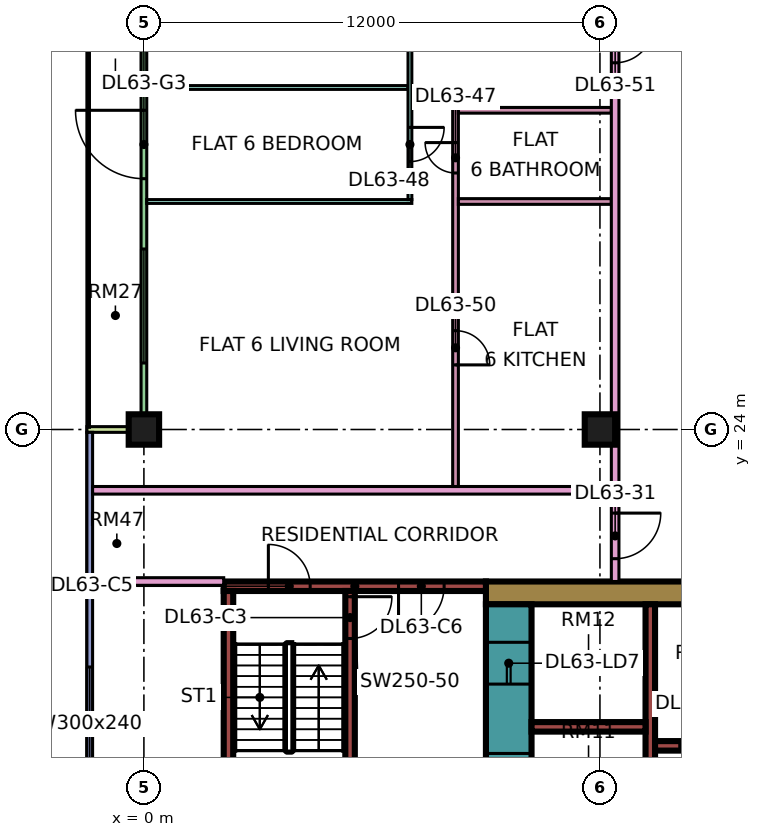
"""IFC4 building model, lengths in metres.
Left out: names, types, materials, properties, quantities, classifications, styles, units other than length and angle.
Written with IfcOpenShell. Run it as: python <this file> out.ifc"""

import sys

from ifc_helpers import new_model, si_unit, direction, frame, frame_2d, origin, origin_2d, place, context, subcontext, project, spatial, rectangle, extrude, element, fill, save


model = new_model("IFC4")
c1 = context("Model", 3, precision=1e-05, world=origin(), true_north=direction((0.0, 1.0)))
c2 = subcontext(c1, "Body", "Model", "MODEL_VIEW")
j1 = project(units=[si_unit("LENGTHUNIT", "METRE"), si_unit("PLANEANGLEUNIT", "RADIAN")], contexts=[c1])
p1 = place(None, origin())
s1 = spatial("IfcSite", under=j1, at=p1, CompositionType="ELEMENT")
p2 = place(p1, origin())
s2 = spatial("IfcBuilding", under=s1, at=p2, CompositionType="ELEMENT")
p3 = place(p2, frame((0.0, 0.0, 273.4)))
s3 = spatial("IfcBuildingStorey", under=s2, at=p3, CompositionType="ELEMENT", Elevation=273.4)
for number, where, z_axis, x_axis in (
    (1, (0.0, 24.0, 0.0), (0.0, 0.0, 1.0), (1.0, 0.0, 0.0)),
    (2, (12.0, 24.0, 0.0), (0.0, 0.0, 1.0), (1.0, 0.0, 0.0)),
):
    element("IfcColumn", number, at=place(p3, frame(where, z_axis=z_axis, x_axis=x_axis)), inside=s3, PredefinedType="COLUMN", context=c2, shape_type="SweptSolid", body=[
        extrude(rectangle(XDim=0.8, YDim=0.8, at=origin_2d()), origin(), (0.0, 0.0, 1.0), 3.75),
    ])
p4 = place(p3, frame((9.0, 19.7, 0.0), z_axis=(0.0, 0.0, 1.0), x_axis=(1.0, 0.0, 0.0)))
e3 = element("IfcWall", 3, at=p4, inside=s3, PredefinedType="SHEAR", context=c2, shape_type="SweptSolid", body=[
    extrude(rectangle(XDim=25.0, YDim=0.6, at=frame_2d((12.5, 0.0))), origin(), (0.0, 0.0, 1.0), 3.75),
])
p5 = place(p4, frame((19.1, 0.0, 0.0)))
e4 = element("IfcOpeningElement", 4, at=p5, cuts=e3, PredefinedType="OPENING", context=c2, shape_type="SweptSolid", body=[
    extrude(rectangle(XDim=1.8, YDim=2.4, at=frame_2d((0.9, 1.2))), frame((0.0, 0.31, 0.0), z_axis=(0.0, -1.0, 0.0), x_axis=(1.0, 0.0, 0.0)), (0.0, 0.0, 1.0), 0.62),
])
p6 = place(p3, frame((9.6, 7.6, 0.0), z_axis=(0.0, 0.0, 1.0), x_axis=(0.0, 1.0, 0.0)))
e5 = element("IfcWall", 5, at=p6, inside=s3, PredefinedType="SHEAR", context=c2, shape_type="SweptSolid", body=[
    extrude(rectangle(XDim=11.8, YDim=1.2, at=frame_2d((5.9, 0.0))), origin(), (0.0, 0.0, 1.0), 3.75),
])
p7 = place(p6, frame((4.275, 0.0, 0.0)))
e6 = element("IfcOpeningElement", 6, at=p7, cuts=e5, PredefinedType="OPENING", context=c2, shape_type="SweptSolid", body=[
    extrude(rectangle(XDim=1.1, YDim=2.2, at=frame_2d((0.55, 1.1))), frame((0.0, 0.61, 0.0), z_axis=(0.0, -1.0, 0.0), x_axis=(1.0, 0.0, 0.0)), (0.0, 0.0, 1.0), 1.22),
])
p8 = place(p6, frame((6.775, 0.0, 0.0)))
e7 = element("IfcOpeningElement", 7, at=p8, cuts=e5, PredefinedType="OPENING", context=c2, shape_type="SweptSolid", body=[
    extrude(rectangle(XDim=1.1, YDim=2.2, at=frame_2d((0.55, 1.1))), frame((0.0, 0.61, 0.0), z_axis=(0.0, -1.0, 0.0), x_axis=(1.0, 0.0, 0.0)), (0.0, 0.0, 1.0), 1.22),
])
p9 = place(p6, frame((9.7, 0.0, 0.0)))
e8 = element("IfcOpeningElement", 8, at=p9, cuts=e5, PredefinedType="OPENING", context=c2, shape_type="SweptSolid", body=[
    extrude(rectangle(XDim=1.1, YDim=2.2, at=frame_2d((0.55, 1.1))), frame((0.0, 0.61, 0.0), z_axis=(0.0, -1.0, 0.0), x_axis=(1.0, 0.0, 0.0)), (0.0, 0.0, 1.0), 1.22),
])
p10 = place(p6, frame((1.95, 0.0, 0.0)))
e9 = element("IfcOpeningElement", 9, at=p10, cuts=e5, PredefinedType="OPENING", context=c2, shape_type="SweptSolid", body=[
    extrude(rectangle(XDim=0.9, YDim=2.1, at=frame_2d((0.45, 1.05))), frame((0.0, 0.61, 0.0), z_axis=(0.0, -1.0, 0.0), x_axis=(1.0, 0.0, 0.0)), (0.0, 0.0, 1.0), 1.22),
])
p11 = place(p3, frame((13.325, 7.6, 0.0), z_axis=(0.0, 0.0, 1.0), x_axis=(0.0, 1.0, 0.0)))
e10 = element("IfcWall", 10, at=p11, inside=s3, PredefinedType="SHEAR", context=c2, shape_type="SweptSolid", body=[
    extrude(rectangle(XDim=11.8, YDim=0.25, at=frame_2d((5.9, 0.0))), origin(), (0.0, 0.0, 1.0), 3.75),
])
p12 = place(p3, frame((13.45, 15.675, 0.0), z_axis=(0.0, 0.0, 1.0), x_axis=(1.0, 0.0, 0.0)))
e11 = element("IfcWall", 11, at=p12, inside=s3, PredefinedType="SHEAR", context=c2, shape_type="SweptSolid", body=[
    extrude(rectangle(XDim=13.75, YDim=0.25, at=frame_2d((6.875, 0.0))), origin(), (0.0, 0.0, 1.0), 3.75),
])
p13 = place(p12, frame((0.65, 0.0, 0.0)))
e12 = element("IfcOpeningElement", 12, at=p13, cuts=e11, PredefinedType="OPENING", context=c2, shape_type="SweptSolid", body=[
    extrude(rectangle(XDim=1.2, YDim=2.2, at=frame_2d((0.6, 1.1))), frame((0.0, 0.135, 0.0), z_axis=(0.0, -1.0, 0.0), x_axis=(1.0, 0.0, 0.0)), (0.0, 0.0, 1.0), 0.27),
])
p14 = place(p12, frame((3.4, 0.0, 0.0)))
e13 = element("IfcOpeningElement", 13, at=p14, cuts=e11, PredefinedType="OPENING", context=c2, shape_type="SweptSolid", body=[
    extrude(rectangle(XDim=1.2, YDim=2.2, at=frame_2d((0.6, 1.1))), frame((0.0, 0.135, 0.0), z_axis=(0.0, -1.0, 0.0), x_axis=(1.0, 0.0, 0.0)), (0.0, 0.0, 1.0), 0.27),
])
p15 = place(p12, frame((6.15, 0.0, 0.0)))
e14 = element("IfcOpeningElement", 14, at=p15, cuts=e11, PredefinedType="OPENING", context=c2, shape_type="SweptSolid", body=[
    extrude(rectangle(XDim=1.2, YDim=2.2, at=frame_2d((0.6, 1.1))), frame((0.0, 0.135, 0.0), z_axis=(0.0, -1.0, 0.0), x_axis=(1.0, 0.0, 0.0)), (0.0, 0.0, 1.0), 0.27),
])
p16 = place(p12, frame((8.9, 0.0, 0.0)))
e15 = element("IfcOpeningElement", 15, at=p16, cuts=e11, PredefinedType="OPENING", context=c2, shape_type="SweptSolid", body=[
    extrude(rectangle(XDim=1.2, YDim=2.2, at=frame_2d((0.6, 1.1))), frame((0.0, 0.135, 0.0), z_axis=(0.0, -1.0, 0.0), x_axis=(1.0, 0.0, 0.0)), (0.0, 0.0, 1.0), 0.27),
])
p17 = place(p12, frame((11.8, 0.0, 0.0)))
e16 = element("IfcOpeningElement", 16, at=p17, cuts=e11, PredefinedType="OPENING", context=c2, shape_type="SweptSolid", body=[
    extrude(rectangle(XDim=0.9, YDim=2.1, at=frame_2d((0.45, 1.05))), frame((0.0, 0.135, 0.0), z_axis=(0.0, -1.0, 0.0), x_axis=(1.0, 0.0, 0.0)), (0.0, 0.0, 1.0), 0.27),
])
p18 = place(p3, frame((10.2, 16.175, 0.0), z_axis=(0.0, 0.0, 1.0), x_axis=(1.0, 0.0, 0.0)))
e17 = element("IfcWall", 17, at=p18, inside=s3, PredefinedType="SHEAR", context=c2, shape_type="SweptSolid", body=[
    extrude(rectangle(XDim=3.0, YDim=0.25, at=frame_2d((1.5, 0.0))), origin(), (0.0, 0.0, 1.0), 3.75),
])
p19 = place(p3, frame((2.1, 19.875, 0.0), z_axis=(0.0, 0.0, 1.0), x_axis=(1.0, 0.0, 0.0)))
e18 = element("IfcWall", 18, at=p19, inside=s3, PredefinedType="SHEAR", context=c2, shape_type="SweptSolid", body=[
    extrude(rectangle(XDim=6.9, YDim=0.25, at=frame_2d((3.45, 0.0))), origin(), (0.0, 0.0, 1.0), 3.75),
])
p20 = place(p19, frame((1.175, 0.0, 0.0)))
e19 = element("IfcOpeningElement", 19, at=p20, cuts=e18, PredefinedType="OPENING", context=c2, shape_type="SweptSolid", body=[
    extrude(rectangle(XDim=1.1, YDim=2.2, at=frame_2d((0.55, 1.1))), frame((0.0, 0.135, 0.0), z_axis=(0.0, -1.0, 0.0), x_axis=(1.0, 0.0, 0.0)), (0.0, 0.0, 1.0), 0.27),
])
p21 = place(p19, frame((4.6, 0.0, 0.0)))
e20 = element("IfcOpeningElement", 20, at=p21, cuts=e18, PredefinedType="OPENING", context=c2, shape_type="SweptSolid", body=[
    extrude(rectangle(XDim=1.2, YDim=2.2, at=frame_2d((0.6, 1.1))), frame((0.0, 0.135, 0.0), z_axis=(0.0, -1.0, 0.0), x_axis=(1.0, 0.0, 0.0)), (0.0, 0.0, 1.0), 0.27),
])
p22 = place(p3, frame((2.225, 13.25, 0.0), z_axis=(0.0, 0.0, 1.0), x_axis=(0.0, 1.0, 0.0)))
e21 = element("IfcWall", 21, at=p22, inside=s3, PredefinedType="SHEAR", context=c2, shape_type="SweptSolid", body=[
    extrude(rectangle(XDim=6.5, YDim=0.25, at=frame_2d((3.25, 0.0))), origin(), (0.0, 0.0, 1.0), 3.75),
])
p23 = place(p3, frame((5.425, 13.25, 0.0), z_axis=(0.0, 0.0, 1.0), x_axis=(0.0, 1.0, 0.0)))
e22 = element("IfcWall", 22, at=p23, inside=s3, PredefinedType="SHEAR", context=c2, shape_type="SweptSolid", body=[
    extrude(rectangle(XDim=6.5, YDim=0.25, at=frame_2d((3.25, 0.0))), origin(), (0.0, 0.0, 1.0), 3.75),
])
p24 = place(p23, frame((5.25, 0.0, 0.0)))
e23 = element("IfcOpeningElement", 23, at=p24, cuts=e22, PredefinedType="OPENING", context=c2, shape_type="SweptSolid", body=[
    extrude(rectangle(XDim=1.1, YDim=2.2, at=frame_2d((0.55, 1.1))), frame((0.0, 0.135, 0.0), z_axis=(0.0, -1.0, 0.0), x_axis=(1.0, 0.0, 0.0)), (0.0, 0.0, 1.0), 0.27),
])
p25 = place(p3, frame((0.0, 35.925, 0.0), z_axis=(0.0, 0.0, 1.0), x_axis=(0.0, -1.0, 0.0)))
e24 = element("IfcWall", 24, at=p25, inside=s3, PredefinedType="SOLIDWALL", context=c2, shape_type="SweptSolid", body=[
    extrude(rectangle(XDim=11.85, YDim=0.15, at=frame_2d((5.925, 0.0))), origin(), (0.0, 0.0, 1.0), 3.35),
])
p26 = place(p25, frame((0.775, 0.0, 0.45)))
e25 = element("IfcOpeningElement", 25, at=p26, cuts=e24, PredefinedType="OPENING", context=c2, shape_type="SweptSolid", body=[
    extrude(rectangle(XDim=1.8, YDim=2.4, at=frame_2d((0.9, 1.2))), frame((0.0, 0.085, 0.0), z_axis=(0.0, -1.0, 0.0), x_axis=(1.0, 0.0, 0.0)), (0.0, 0.0, 1.0), 0.17),
])
p27 = place(p25, frame((3.525, 0.0, 0.0)))
e26 = element("IfcOpeningElement", 26, at=p27, cuts=e24, PredefinedType="OPENING", context=c2, shape_type="SweptSolid", body=[
    extrude(rectangle(XDim=1.8, YDim=2.4, at=frame_2d((0.9, 1.2))), frame((0.0, 0.085, 0.0), z_axis=(0.0, -1.0, 0.0), x_axis=(1.0, 0.0, 0.0)), (0.0, 0.0, 1.0), 0.17),
])
p28 = place(p25, frame((7.175, 0.0, 0.45)))
e27 = element("IfcOpeningElement", 27, at=p28, cuts=e24, PredefinedType="OPENING", context=c2, shape_type="SweptSolid", body=[
    extrude(rectangle(XDim=3.0, YDim=2.4, at=frame_2d((1.5, 1.2))), frame((0.0, 0.085, 0.0), z_axis=(0.0, -1.0, 0.0), x_axis=(1.0, 0.0, 0.0)), (0.0, 0.0, 1.0), 0.17),
])
p29 = place(p3, frame((-1.5, 24.0, 0.0), z_axis=(0.0, 0.0, 1.0), x_axis=(1.0, 0.0, 0.0)))
e28 = element("IfcWall", 28, at=p29, inside=s3, PredefinedType="SOLIDWALL", context=c2, shape_type="SweptSolid", body=[
    extrude(rectangle(XDim=1.5, YDim=0.15, at=frame_2d((0.75, 0.0))), origin(), (0.0, 0.0, 1.0), 3.35),
])
p30 = place(p3, frame((-1.425, 23.925, 0.0), z_axis=(0.0, 0.0, 1.0), x_axis=(0.0, -1.0, 0.0)))
e29 = element("IfcWall", 29, at=p30, inside=s3, PredefinedType="SOLIDWALL", context=c2, shape_type="SweptSolid", body=[
    extrude(rectangle(XDim=11.425, YDim=0.15, at=frame_2d((5.712, 0.0))), origin(), (0.0, 0.0, 1.0), 3.35),
])
p31 = place(p30, frame((6.175, 0.0, 0.45)))
e30 = element("IfcOpeningElement", 30, at=p31, cuts=e29, PredefinedType="OPENING", context=c2, shape_type="SweptSolid", body=[
    extrude(rectangle(XDim=3.0, YDim=2.4, at=frame_2d((1.5, 1.2))), frame((0.0, 0.085, 0.0), z_axis=(0.0, -1.0, 0.0), x_axis=(1.0, 0.0, 0.0)), (0.0, 0.0, 1.0), 0.17),
])
p32 = place(p3, frame((-1.35, 20.0, 0.0), z_axis=(0.0, 0.0, 1.0), x_axis=(1.0, 0.0, 0.0)))
e31 = element("IfcWall", 31, at=p32, inside=s3, PredefinedType="PARTITIONING", context=c2, shape_type="SweptSolid", body=[
    extrude(rectangle(XDim=3.45, YDim=0.2, at=frame_2d((1.725, 0.0))), origin(), (0.0, 0.0, 1.0), 3.35),
])
p33 = place(p3, frame((-1.35, 22.4, 0.0), z_axis=(0.0, 0.0, 1.0), x_axis=(1.0, 0.0, 0.0)))
e32 = element("IfcWall", 32, at=p33, inside=s3, PredefinedType="PARTITIONING", context=c2, shape_type="SweptSolid", body=[
    extrude(rectangle(XDim=13.65, YDim=0.2, at=frame_2d((6.825, 0.0))), origin(), (0.0, 0.0, 1.0), 3.35),
])
p34 = place(p3, frame((0.074, 30.0, 0.0), z_axis=(0.0, 0.0, 1.0), x_axis=(1.0, 0.0, 0.0)))
e33 = element("IfcWall", 33, at=p34, inside=s3, PredefinedType="PARTITIONING", context=c2, shape_type="SweptSolid", body=[
    extrude(rectangle(XDim=6.976, YDim=0.1, at=frame_2d((3.488, 0.0))), origin(), (0.0, 0.0, 1.0), 3.35),
])
p35 = place(p3, frame((0.074, 33.0, 0.0), z_axis=(0.0, 0.0, 1.0), x_axis=(1.0, 0.0, 0.0)))
e34 = element("IfcWall", 34, at=p35, inside=s3, PredefinedType="PARTITIONING", context=c2, shape_type="SweptSolid", body=[
    extrude(rectangle(XDim=6.876, YDim=0.1, at=frame_2d((3.438, 0.0))), origin(), (0.0, 0.0, 1.0), 3.35),
])
p36 = place(p3, frame((7.0, 30.05, 0.0), z_axis=(0.0, 0.0, 1.0), x_axis=(0.0, 1.0, 0.0)))
e35 = element("IfcWall", 35, at=p36, inside=s3, PredefinedType="PARTITIONING", context=c2, shape_type="SweptSolid", body=[
    extrude(rectangle(XDim=5.85, YDim=0.1, at=frame_2d((2.925, 0.0))), origin(), (0.0, 0.0, 1.0), 3.35),
])
p37 = place(p36, frame((1.0, 0.0, 0.0)))
e36 = element("IfcOpeningElement", 36, at=p37, cuts=e35, PredefinedType="OPENING", context=c2, shape_type="SweptSolid", body=[
    extrude(rectangle(XDim=0.9, YDim=2.1, at=frame_2d((0.45, 1.05))), frame((0.0, 0.06, 0.0), z_axis=(0.0, -1.0, 0.0), x_axis=(1.0, 0.0, 0.0)), (0.0, 0.0, 1.0), 0.12),
])
p38 = place(p36, frame((4.0, 0.0, 0.0)))
e37 = element("IfcOpeningElement", 37, at=p38, cuts=e35, PredefinedType="OPENING", context=c2, shape_type="SweptSolid", body=[
    extrude(rectangle(XDim=0.9, YDim=2.1, at=frame_2d((0.45, 1.05))), frame((0.0, 0.06, 0.0), z_axis=(0.0, -1.0, 0.0), x_axis=(1.0, 0.0, 0.0)), (0.0, 0.0, 1.0), 0.12),
])
p39 = place(p3, frame((8.2, 22.5, 0.0), z_axis=(0.0, 0.0, 1.0), x_axis=(0.0, 1.0, 0.0)))
e38 = element("IfcWall", 38, at=p39, inside=s3, PredefinedType="PARTITIONING", context=c2, shape_type="SweptSolid", body=[
    extrude(rectangle(XDim=9.975, YDim=0.15, at=frame_2d((4.988, 0.0))), origin(), (0.0, 0.0, 1.0), 3.35),
])
p40 = place(p39, frame((8.25, 0.0, 0.0)))
e39 = element("IfcOpeningElement", 39, at=p40, cuts=e38, PredefinedType="OPENING", context=c2, shape_type="SweptSolid", body=[
    extrude(rectangle(XDim=0.8, YDim=2.1, at=frame_2d((0.4, 1.05))), frame((0.0, 0.085, 0.0), z_axis=(0.0, -1.0, 0.0), x_axis=(1.0, 0.0, 0.0)), (0.0, 0.0, 1.0), 0.17),
])
p41 = place(p39, frame((3.2, 0.0, 0.0)))
e40 = element("IfcOpeningElement", 40, at=p41, cuts=e38, PredefinedType="OPENING", context=c2, shape_type="SweptSolid", body=[
    extrude(rectangle(XDim=0.9, YDim=2.1, at=frame_2d((0.45, 1.05))), frame((0.0, 0.085, 0.0), z_axis=(0.0, -1.0, 0.0), x_axis=(1.0, 0.0, 0.0)), (0.0, 0.0, 1.0), 0.17),
])
for number, where, z_axis, x_axis in (
    (41, (8.275, 30.0, 0.0), (0.0, 0.0, 1.0), (1.0, 0.0, 0.0)),
    (42, (8.275, 32.4, 0.0), (0.0, 0.0, 1.0), (1.0, 0.0, 0.0)),
):
    element("IfcWall", number, at=place(p3, frame(where, z_axis=z_axis, x_axis=x_axis)), inside=s3, PredefinedType="PARTITIONING", context=c2, shape_type="SweptSolid", body=[
        extrude(rectangle(XDim=4.025, YDim=0.15, at=frame_2d((2.013, 0.0))), origin(), (0.0, 0.0, 1.0), 3.35),
    ])
p42 = place(p3, frame((12.4, 20.0, 0.0), z_axis=(0.0, 0.0, 1.0), x_axis=(0.0, 1.0, 0.0)))
e43 = element("IfcWall", 43, at=p42, inside=s3, PredefinedType="PARTITIONING", context=c2, shape_type="SweptSolid", body=[
    extrude(rectangle(XDim=34.0, YDim=0.2, at=frame_2d((17.0, 0.0))), origin(), (0.0, 0.0, 1.0), 3.35),
])
p43 = place(p42, frame((16.95, 0.0, 0.0)))
e44 = element("IfcOpeningElement", 44, at=p43, cuts=e43, PredefinedType="OPENING", context=c2, shape_type="SweptSolid", body=[
    extrude(rectangle(XDim=1.0, YDim=2.1, at=frame_2d((0.5, 1.05))), frame((0.0, 0.11, 0.0), z_axis=(0.0, -1.0, 0.0), x_axis=(1.0, 0.0, 0.0)), (0.0, 0.0, 1.0), 0.22),
])
p44 = place(p42, frame((0.6, 0.0, 0.0)))
e45 = element("IfcOpeningElement", 45, at=p44, cuts=e43, PredefinedType="OPENING", context=c2, shape_type="SweptSolid", body=[
    extrude(rectangle(XDim=1.2, YDim=2.1, at=frame_2d((0.6, 1.05))), frame((0.0, 0.11, 0.0), z_axis=(0.0, -1.0, 0.0), x_axis=(1.0, 0.0, 0.0)), (0.0, 0.0, 1.0), 0.22),
])
p45 = place(p42, frame((13.65, 0.0, 0.0)))
e46 = element("IfcOpeningElement", 46, at=p45, cuts=e43, PredefinedType="OPENING", context=c2, shape_type="SweptSolid", body=[
    extrude(rectangle(XDim=1.0, YDim=2.1, at=frame_2d((0.5, 1.05))), frame((0.0, 0.11, 0.0), z_axis=(0.0, -1.0, 0.0), x_axis=(1.0, 0.0, 0.0)), (0.0, 0.0, 1.0), 0.22),
])
p46 = place(p26, origin())
e47 = element("IfcWindow", 47, at=p46, inside=s3, PartitioningType="SINGLE_PANEL", PredefinedType="WINDOW", context=c2, shape_type="SweptSolid", body=[
    extrude(rectangle(XDim=1.8, YDim=2.4, at=frame_2d((0.9, 1.2))), frame((0.0, 0.03, 0.0), z_axis=(0.0, -1.0, 0.0), x_axis=(1.0, 0.0, 0.0)), (0.0, 0.0, 1.0), 0.06),
])
fill(e25, e47)
p47 = place(p27, frame((1.8, 0.0, 0.0), z_axis=(0.0, 0.0, 1.0), x_axis=(-1.0, 0.0, 0.0)))
e48 = element("IfcDoor", 48, at=p47, inside=s3, OperationType="DOUBLE_DOOR_SINGLE_SWING", PredefinedType="DOOR", context=c2, shape_type="SweptSolid", body=[
    extrude(rectangle(XDim=1.8, YDim=2.4, at=frame_2d((0.9, 1.2))), frame((0.0, 0.025, 0.0), z_axis=(0.0, -1.0, 0.0), x_axis=(1.0, 0.0, 0.0)), (0.0, 0.0, 1.0), 0.05),
])
fill(e26, e48)
p48 = place(p28, origin())
e49 = element("IfcWindow", 49, at=p48, inside=s3, PartitioningType="SINGLE_PANEL", PredefinedType="WINDOW", context=c2, shape_type="SweptSolid", body=[
    extrude(rectangle(XDim=3.0, YDim=2.4, at=frame_2d((1.5, 1.2))), frame((0.0, 0.03, 0.0), z_axis=(0.0, -1.0, 0.0), x_axis=(1.0, 0.0, 0.0)), (0.0, 0.0, 1.0), 0.06),
])
fill(e27, e49)
p49 = place(p31, origin())
e50 = element("IfcWindow", 50, at=p49, inside=s3, PartitioningType="SINGLE_PANEL", PredefinedType="WINDOW", context=c2, shape_type="SweptSolid", body=[
    extrude(rectangle(XDim=3.0, YDim=2.4, at=frame_2d((1.5, 1.2))), frame((0.0, 0.03, 0.0), z_axis=(0.0, -1.0, 0.0), x_axis=(1.0, 0.0, 0.0)), (0.0, 0.0, 1.0), 0.06),
])
fill(e30, e50)
p50 = place(p13, origin())
e51 = element("IfcDoor", 51, at=p50, inside=s3, OperationType="DOUBLE_DOOR_SLIDING", PredefinedType="DOOR", context=c2, shape_type="SweptSolid", body=[
    extrude(rectangle(XDim=1.2, YDim=2.2, at=frame_2d((0.6, 1.1))), frame((0.0, 0.025, 0.0), z_axis=(0.0, -1.0, 0.0), x_axis=(1.0, 0.0, 0.0)), (0.0, 0.0, 1.0), 0.05),
])
fill(e12, e51)
p51 = place(p8, origin())
e52 = element("IfcDoor", 52, at=p51, inside=s3, OperationType="DOUBLE_DOOR_SLIDING", PredefinedType="DOOR", context=c2, shape_type="SweptSolid", body=[
    extrude(rectangle(XDim=1.1, YDim=2.2, at=frame_2d((0.55, 1.1))), frame((0.0, 0.025, 0.0), z_axis=(0.0, -1.0, 0.0), x_axis=(1.0, 0.0, 0.0)), (0.0, 0.0, 1.0), 0.05),
])
fill(e7, e52)
p52 = place(p9, origin())
e53 = element("IfcDoor", 53, at=p52, inside=s3, OperationType="DOUBLE_DOOR_SLIDING", PredefinedType="DOOR", context=c2, shape_type="SweptSolid", body=[
    extrude(rectangle(XDim=1.1, YDim=2.2, at=frame_2d((0.55, 1.1))), frame((0.0, 0.025, 0.0), z_axis=(0.0, -1.0, 0.0), x_axis=(1.0, 0.0, 0.0)), (0.0, 0.0, 1.0), 0.05),
])
fill(e8, e53)
p53 = place(p24, origin())
e54 = element("IfcDoor", 54, at=p53, inside=s3, OperationType="SINGLE_SWING_RIGHT", PredefinedType="DOOR", context=c2, shape_type="SweptSolid", body=[
    extrude(rectangle(XDim=1.1, YDim=2.2, at=frame_2d((0.55, 1.1))), frame((0.0, 0.025, 0.0), z_axis=(0.0, -1.0, 0.0), x_axis=(1.0, 0.0, 0.0)), (0.0, 0.0, 1.0), 0.05),
])
fill(e23, e54)
p54 = place(p20, origin())
e55 = element("IfcDoor", 55, at=p54, inside=s3, OperationType="SINGLE_SWING_LEFT", PredefinedType="DOOR", context=c2, shape_type="SweptSolid", body=[
    extrude(rectangle(XDim=1.1, YDim=2.2, at=frame_2d((0.55, 1.1))), frame((0.0, 0.025, 0.0), z_axis=(0.0, -1.0, 0.0), x_axis=(1.0, 0.0, 0.0)), (0.0, 0.0, 1.0), 0.05),
])
fill(e19, e55)
p55 = place(p21, frame((1.2, 0.0, 0.0), z_axis=(0.0, 0.0, 1.0), x_axis=(-1.0, 0.0, 0.0)))
e56 = element("IfcDoor", 56, at=p55, inside=s3, OperationType="SINGLE_SWING_LEFT", PredefinedType="DOOR", context=c2, shape_type="SweptSolid", body=[
    extrude(rectangle(XDim=1.2, YDim=2.2, at=frame_2d((0.6, 1.1))), frame((0.0, 0.025, 0.0), z_axis=(0.0, -1.0, 0.0), x_axis=(1.0, 0.0, 0.0)), (0.0, 0.0, 1.0), 0.05),
])
fill(e20, e56)
p56 = place(p44, origin())
e57 = element("IfcDoor", 57, at=p56, inside=s3, OperationType="SINGLE_SWING_RIGHT", PredefinedType="DOOR", context=c2, shape_type="SweptSolid", body=[
    extrude(rectangle(XDim=1.2, YDim=2.1, at=frame_2d((0.6, 1.05))), frame((0.0, 0.025, 0.0), z_axis=(0.0, -1.0, 0.0), x_axis=(1.0, 0.0, 0.0)), (0.0, 0.0, 1.0), 0.05),
])
fill(e45, e57)
p57 = place(p40, frame((0.8, 0.0, 0.0), z_axis=(0.0, 0.0, 1.0), x_axis=(-1.0, 0.0, 0.0)))
e58 = element("IfcDoor", 58, at=p57, inside=s3, OperationType="SINGLE_SWING_RIGHT", PredefinedType="DOOR", context=c2, shape_type="SweptSolid", body=[
    extrude(rectangle(XDim=0.8, YDim=2.1, at=frame_2d((0.4, 1.05))), frame((0.0, 0.025, 0.0), z_axis=(0.0, -1.0, 0.0), x_axis=(1.0, 0.0, 0.0)), (0.0, 0.0, 1.0), 0.05),
])
fill(e39, e58)
p58 = place(p37, origin())
e59 = element("IfcDoor", 59, at=p58, inside=s3, OperationType="SINGLE_SWING_RIGHT", PredefinedType="DOOR", context=c2, shape_type="SweptSolid", body=[
    extrude(rectangle(XDim=0.9, YDim=2.1, at=frame_2d((0.45, 1.05))), frame((0.0, 0.025, 0.0), z_axis=(0.0, -1.0, 0.0), x_axis=(1.0, 0.0, 0.0)), (0.0, 0.0, 1.0), 0.05),
])
fill(e36, e59)
p59 = place(p41, frame((0.9, 0.0, 0.0), z_axis=(0.0, 0.0, 1.0), x_axis=(-1.0, 0.0, 0.0)))
e60 = element("IfcDoor", 60, at=p59, inside=s3, OperationType="SINGLE_SWING_LEFT", PredefinedType="DOOR", context=c2, shape_type="SweptSolid", body=[
    extrude(rectangle(XDim=0.9, YDim=2.1, at=frame_2d((0.45, 1.05))), frame((0.0, 0.025, 0.0), z_axis=(0.0, -1.0, 0.0), x_axis=(1.0, 0.0, 0.0)), (0.0, 0.0, 1.0), 0.05),
])
fill(e40, e60)
p60 = place(p45, origin())
e61 = element("IfcDoor", 61, at=p60, inside=s3, OperationType="SINGLE_SWING_RIGHT", PredefinedType="DOOR", context=c2, shape_type="SweptSolid", body=[
    extrude(rectangle(XDim=1.0, YDim=2.1, at=frame_2d((0.5, 1.05))), frame((0.0, 0.025, 0.0), z_axis=(0.0, -1.0, 0.0), x_axis=(1.0, 0.0, 0.0)), (0.0, 0.0, 1.0), 0.05),
])
fill(e46, e61)
save(model, sys.argv[1])
